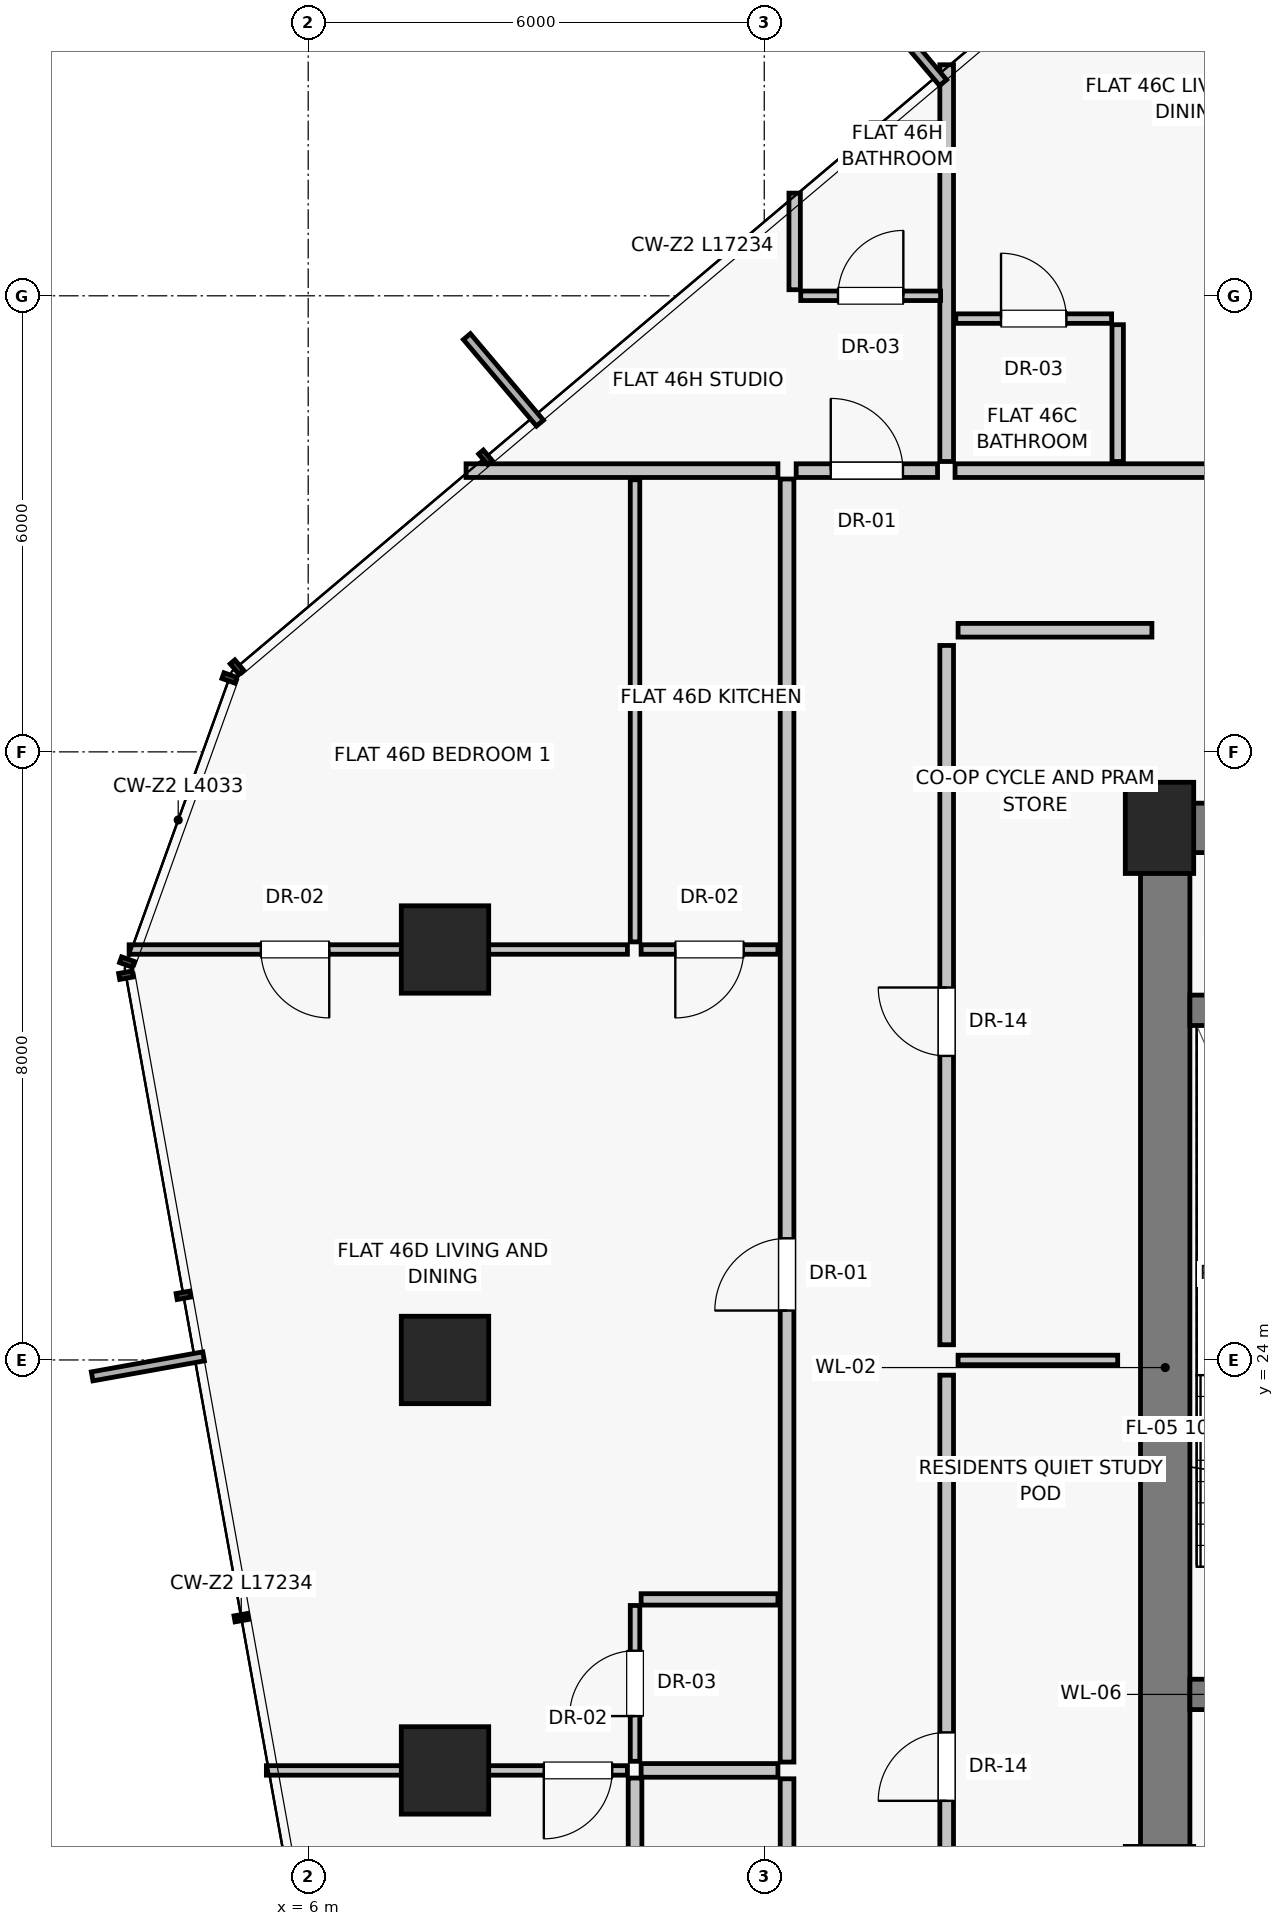
"""IFC4 building model, lengths in metres.
Left out: names, types, materials, properties, quantities, classifications, styles, units other than length and angle.
Written with IfcOpenShell. Run it as: python <this file> out.ifc"""

import sys

from ifc_helpers import new_model, si_unit, direction, frame, frame_2d, origin, origin_2d, place, context, subcontext, project, spatial, rectangle, extrude, source, transform, mapped, element, fill, save


model = new_model("IFC4")
c1 = context("Model", 3, precision=1e-05, world=origin(), true_north=direction((0.0, 1.0)))
c2 = subcontext(c1, "Body", "Model", "MODEL_VIEW")
j1 = project(units=[si_unit("LENGTHUNIT", "METRE"), si_unit("PLANEANGLEUNIT", "RADIAN")], contexts=[c1])
p1 = place(None, origin())
s1 = spatial("IfcSite", under=j1, at=p1, CompositionType="ELEMENT")
p2 = place(p1, origin())
s2 = spatial("IfcBuilding", under=s1, at=p2, CompositionType="ELEMENT")
p3 = place(p2, frame((0.0, 0.0, 163.05)))
s3 = spatial("IfcBuildingStorey", under=s2, at=p3, CompositionType="ELEMENT", Elevation=163.05)
p4 = place(p3, frame((17.2, 31.0, 0.0), z_axis=(0.0, 0.0, 1.0), x_axis=(1.0, 0.0, 0.0)))
e1 = element("IfcColumn", 1, at=p4, inside=s3, PredefinedType="PILASTER", context=c2, shape_type="SweptSolid", body=[
    extrude(rectangle(XDim=0.9, YDim=1.2, at=origin_2d()), origin(), (0.0, 0.0, 1.0), 3.25),
])
for number, where, z_axis, x_axis in (
    (2, (7.8, 29.4, 0.0), (0.0, 0.0, 1.0), (1.0, 0.0, 0.0)),
    (3, (7.8, 24.0, 0.0), (0.0, 0.0, 1.0), (1.0, 0.0, 0.0)),
    (4, (7.8, 18.6, 0.0), (0.0, 0.0, 1.0), (1.0, 0.0, 0.0)),
):
    element("IfcColumn", number, at=place(p3, frame(where, z_axis=z_axis, x_axis=x_axis)), inside=s3, PredefinedType="COLUMN", context=c2, shape_type="SweptSolid", body=[
        extrude(rectangle(XDim=1.15, YDim=1.15, at=origin_2d()), origin(), (0.0, 0.0, 1.0), 3.25),
    ])
p5 = place(p3, frame((17.275, 16.8, 0.0), z_axis=(0.0, 0.0, 1.0), x_axis=(0.0, 1.0, 0.0)))
e5 = element("IfcWall", 5, at=p5, inside=s3, PredefinedType="SHEAR", context=c2, shape_type="SweptSolid", body=[
    extrude(rectangle(XDim=14.2, YDim=0.65, at=frame_2d((7.1, 0.0))), origin(), (0.0, 0.0, 1.0), 3.0),
])
p6 = place(p3, frame((17.2, 31.0, 0.0), z_axis=(0.0, 0.0, 1.0), x_axis=(1.0, 0.0, 0.0)))
e6 = element("IfcWall", 6, at=p6, inside=s3, PredefinedType="SHEAR", context=c2, shape_type="SweptSolid", body=[
    extrude(rectangle(XDim=3.8, YDim=0.65, at=frame_2d((1.9, 0.0))), origin(), (0.0, 0.0, 1.0), 3.0),
])
p7 = place(p6, frame((1.25, 0.0, 0.0)))
e7 = element("IfcOpeningElement", 7, at=p7, cuts=e6, PredefinedType="OPENING", context=c2, shape_type="SweptSolid", body=[
    extrude(rectangle(XDim=0.86, YDim=2.01, at=frame_2d((0.43, 1.005))), frame((0.0, 0.335, 0.0), z_axis=(0.0, -1.0, 0.0), x_axis=(1.0, 0.0, 0.0)), (0.0, 0.0, 1.0), 0.67),
])
p8 = place(p3, frame((17.6, 19.6, 0.0), z_axis=(0.0, 0.0, 1.0), x_axis=(1.0, 0.0, 0.0)))
e8 = element("IfcWall", 8, at=p8, inside=s3, PredefinedType="SHEAR", context=c2, shape_type="SweptSolid", body=[
    extrude(rectangle(XDim=3.4, YDim=0.4, at=frame_2d((1.7, 0.0))), origin(), (0.0, 0.0, 1.0), 3.0),
])
p9 = place(p8, frame((1.05, 0.0, 0.0)))
e9 = element("IfcOpeningElement", 9, at=p9, cuts=e8, PredefinedType="OPENING", context=c2, shape_type="SweptSolid", body=[
    extrude(rectangle(XDim=1.1, YDim=2.03, at=frame_2d((0.55, 1.015))), frame((0.0, 0.21, 0.0), z_axis=(0.0, -1.0, 0.0), x_axis=(1.0, 0.0, 0.0)), (0.0, 0.0, 1.0), 0.42),
])
p10 = place(p3, frame((17.6, 28.6, 0.0), z_axis=(0.0, 0.0, 1.0), x_axis=(1.0, 0.0, 0.0)))
e10 = element("IfcWall", 10, at=p10, inside=s3, PredefinedType="SHEAR", context=c2, shape_type="SweptSolid", body=[
    extrude(rectangle(XDim=3.4, YDim=0.4, at=frame_2d((1.7, 0.0))), origin(), (0.0, 0.0, 1.0), 3.0),
])
p11 = place(p3, frame((14.4, 14.4, 0.0), z_axis=(0.0, 0.0, 1.0), x_axis=(0.0, 1.0, 0.0)))
e11 = element("IfcWall", 11, at=p11, inside=s3, PredefinedType="PARTITIONING", context=c2, shape_type="SweptSolid", body=[
    extrude(rectangle(XDim=9.4, YDim=0.18, at=frame_2d((4.7, 0.0))), origin(), (0.0, 0.0, 1.0), 3.0),
])
p12 = place(p11, frame((3.8, 0.0, 0.0)))
e12 = element("IfcOpeningElement", 12, at=p12, cuts=e11, PredefinedType="OPENING", context=c2, shape_type="SweptSolid", body=[
    extrude(rectangle(XDim=0.9, YDim=2.01, at=frame_2d((0.45, 1.005))), frame((0.0, 0.1, 0.0), z_axis=(0.0, -1.0, 0.0), x_axis=(1.0, 0.0, 0.0)), (0.0, 0.0, 1.0), 0.2),
])
p13 = place(p3, frame((14.4, 24.2, 0.0), z_axis=(0.0, 0.0, 1.0), x_axis=(0.0, 1.0, 0.0)))
e13 = element("IfcWall", 13, at=p13, inside=s3, PredefinedType="PARTITIONING", context=c2, shape_type="SweptSolid", body=[
    extrude(rectangle(XDim=9.2, YDim=0.18, at=frame_2d((4.6, 0.0))), origin(), (0.0, 0.0, 1.0), 3.0),
])
p14 = place(p13, frame((3.8, 0.0, 0.0)))
e14 = element("IfcOpeningElement", 14, at=p14, cuts=e13, PredefinedType="OPENING", context=c2, shape_type="SweptSolid", body=[
    extrude(rectangle(XDim=0.9, YDim=2.01, at=frame_2d((0.45, 1.005))), frame((0.0, 0.1, 0.0), z_axis=(0.0, -1.0, 0.0), x_axis=(1.0, 0.0, 0.0)), (0.0, 0.0, 1.0), 0.2),
])
p15 = place(p3, frame((14.55, 24.0, 0.0), z_axis=(0.0, 0.0, 1.0), x_axis=(1.0, 0.0, 0.0)))
e15 = element("IfcWall", 15, at=p15, inside=s3, PredefinedType="PARTITIONING", context=c2, shape_type="SweptSolid", body=[
    extrude(rectangle(XDim=2.1, YDim=0.125, at=frame_2d((1.05, 0.0))), origin(), (0.0, 0.0, 1.0), 3.0),
])
p16 = place(p3, frame((14.55, 33.6, 0.0), z_axis=(0.0, 0.0, 1.0), x_axis=(1.0, 0.0, 0.0)))
e16 = element("IfcWall", 16, at=p16, inside=s3, PredefinedType="PARTITIONING", context=c2, shape_type="SweptSolid", body=[
    extrude(rectangle(XDim=2.55, YDim=0.18, at=frame_2d((1.275, 0.0))), origin(), (0.0, 0.0, 1.0), 3.0),
])
p17 = place(p3, frame((14.4, 35.82, 0.0), z_axis=(0.0, 0.0, 1.0), x_axis=(0.0, 1.0, 0.0)))
e17 = element("IfcWall", 17, at=p17, inside=s3, PredefinedType="PARTITIONING", context=c2, shape_type="SweptSolid", body=[
    extrude(rectangle(XDim=5.22, YDim=0.18, at=frame_2d((2.61, 0.0))), origin(), (0.0, 0.0, 1.0), 3.0),
])
p18 = place(p3, frame((14.51, 35.7, 0.0), z_axis=(0.0, 0.0, 1.0), x_axis=(1.0, 0.0, 0.0)))
e18 = element("IfcWall", 18, at=p18, inside=s3, PredefinedType="PARTITIONING", context=c2, shape_type="SweptSolid", body=[
    extrude(rectangle(XDim=11.904, YDim=0.18, at=frame_2d((5.952, 0.0))), origin(), (0.0, 0.0, 1.0), 2.58),
])
p19 = place(p18, frame((3.874, 0.0, 0.0)))
e19 = element("IfcOpeningElement", 19, at=p19, cuts=e18, PredefinedType="OPENING", context=c2, shape_type="SweptSolid", body=[
    extrude(rectangle(XDim=0.95, YDim=2.02, at=frame_2d((0.475, 1.01))), frame((0.0, 0.1, 0.0), z_axis=(0.0, -1.0, 0.0), x_axis=(1.0, 0.0, 0.0)), (0.0, 0.0, 1.0), 0.2),
])
p20 = place(p3, frame((16.65, 35.82, 0.0), z_axis=(0.0, 0.0, 1.0), x_axis=(0.0, 1.0, 0.0)))
e20 = element("IfcWall", 20, at=p20, inside=s3, PredefinedType="PARTITIONING", context=c2, shape_type="SweptSolid", body=[
    extrude(rectangle(XDim=1.8, YDim=0.15, at=frame_2d((0.9, 0.0))), origin(), (0.0, 0.0, 1.0), 3.0),
])
p21 = place(p3, frame((14.52, 37.7, 0.0), z_axis=(0.0, 0.0, 1.0), x_axis=(1.0, 0.0, 0.0)))
e21 = element("IfcWall", 21, at=p21, inside=s3, PredefinedType="PARTITIONING", context=c2, shape_type="SweptSolid", body=[
    extrude(rectangle(XDim=2.05, YDim=0.125, at=frame_2d((1.025, 0.0))), origin(), (0.0, 0.0, 1.0), 3.0),
])
p22 = place(p21, frame((0.595, 0.0, 0.0)))
e22 = element("IfcOpeningElement", 22, at=p22, cuts=e21, PredefinedType="OPENING", context=c2, shape_type="SweptSolid", body=[
    extrude(rectangle(XDim=0.86, YDim=2.01, at=frame_2d((0.43, 1.005))), frame((0.0, 0.073, 0.0), z_axis=(0.0, -1.0, 0.0), x_axis=(1.0, 0.0, 0.0)), (0.0, 0.0, 1.0), 0.145),
])
p23 = place(p3, frame((12.18, 35.7, 0.0), z_axis=(0.0, 0.0, 1.0), x_axis=(-1.0, 0.0, 0.0)))
e23 = element("IfcWall", 23, at=p23, inside=s3, PredefinedType="PARTITIONING", context=c2, shape_type="SweptSolid", body=[
    extrude(rectangle(XDim=4.103, YDim=0.18, at=frame_2d((2.052, 0.0))), origin(), (0.0, 0.0, 1.0), 3.0),
])
p24 = place(p3, frame((12.3, 12.21, 0.0), z_axis=(0.0, 0.0, 1.0), x_axis=(0.0, 1.0, 0.0)))
e24 = element("IfcWall", 24, at=p24, inside=s3, PredefinedType="PARTITIONING", context=c2, shape_type="SweptSolid", body=[
    extrude(rectangle(XDim=6.28, YDim=0.18, at=frame_2d((3.14, 0.0))), origin(), (0.0, 0.0, 1.0), 2.58),
])
p25 = place(p24, frame((2.64, 0.0, 0.0)))
e25 = element("IfcOpeningElement", 25, at=p25, cuts=e24, PredefinedType="OPENING", context=c2, shape_type="SweptSolid", body=[
    extrude(rectangle(XDim=1.0, YDim=2.01, at=frame_2d((0.5, 1.005))), frame((0.0, 0.1, 0.0), z_axis=(0.0, -1.0, 0.0), x_axis=(1.0, 0.0, 0.0)), (0.0, 0.0, 1.0), 0.2),
])
p26 = place(p3, frame((12.3, 18.71, 0.0), z_axis=(0.0, 0.0, 1.0), x_axis=(0.0, 1.0, 0.0)))
e26 = element("IfcWall", 26, at=p26, inside=s3, PredefinedType="PARTITIONING", context=c2, shape_type="SweptSolid", body=[
    extrude(rectangle(XDim=16.88, YDim=0.18, at=frame_2d((8.44, 0.0))), origin(), (0.0, 0.0, 1.0), 2.58),
])
p27 = place(p26, frame((5.94, 0.0, 0.0)))
e27 = element("IfcOpeningElement", 27, at=p27, cuts=e26, PredefinedType="OPENING", context=c2, shape_type="SweptSolid", body=[
    extrude(rectangle(XDim=0.95, YDim=2.02, at=frame_2d((0.475, 1.01))), frame((0.0, 0.1, 0.0), z_axis=(0.0, -1.0, 0.0), x_axis=(1.0, 0.0, 0.0)), (0.0, 0.0, 1.0), 0.2),
])
p28 = place(p3, frame((10.3, 12.22, 0.0), z_axis=(0.0, 0.0, 1.0), x_axis=(0.0, 1.0, 0.0)))
e28 = element("IfcWall", 28, at=p28, inside=s3, PredefinedType="PARTITIONING", context=c2, shape_type="SweptSolid", body=[
    extrude(rectangle(XDim=6.28, YDim=0.18, at=frame_2d((3.14, 0.0))), origin(), (0.0, 0.0, 1.0), 3.0),
])
p29 = place(p3, frame((12.18, 18.6, 0.0), z_axis=(0.0, 0.0, 1.0), x_axis=(-1.0, 0.0, 0.0)))
e29 = element("IfcWall", 29, at=p29, inside=s3, PredefinedType="PARTITIONING", context=c2, shape_type="SweptSolid", body=[
    extrude(rectangle(XDim=1.8, YDim=0.18, at=frame_2d((0.9, 0.0))), origin(), (0.0, 0.0, 1.0), 2.378),
])
p30 = place(p3, frame((10.2, 18.6, 0.0), z_axis=(0.0, 0.0, 1.0), x_axis=(-1.0, 0.0, 0.0)))
e30 = element("IfcWall", 30, at=p30, inside=s3, PredefinedType="PARTITIONING", context=c2, shape_type="SweptSolid", body=[
    extrude(rectangle(XDim=4.75, YDim=0.125, at=frame_2d((2.375, 0.0))), origin(), (0.0, 0.0, 1.0), 2.378),
])
p31 = place(p30, frame((0.2, 0.0, 0.0)))
e31 = element("IfcOpeningElement", 31, at=p31, cuts=e30, PredefinedType="OPENING", context=c2, shape_type="SweptSolid", body=[
    extrude(rectangle(XDim=0.9, YDim=2.01, at=frame_2d((0.45, 1.005))), frame((0.0, 0.073, 0.0), z_axis=(0.0, -1.0, 0.0), x_axis=(1.0, 0.0, 0.0)), (0.0, 0.0, 1.0), 0.145),
])
p32 = place(p3, frame((12.18, 20.85, 0.0), z_axis=(0.0, 0.0, 1.0), x_axis=(-1.0, 0.0, 0.0)))
e32 = element("IfcWall", 32, at=p32, inside=s3, PredefinedType="PARTITIONING", context=c2, shape_type="SweptSolid", body=[
    extrude(rectangle(XDim=1.8, YDim=0.15, at=frame_2d((0.9, 0.0))), origin(), (0.0, 0.0, 1.0), 3.0),
])
p33 = place(p3, frame((10.3, 18.72, 0.0), z_axis=(0.0, 0.0, 1.0), x_axis=(0.0, 1.0, 0.0)))
e33 = element("IfcWall", 33, at=p33, inside=s3, PredefinedType="PARTITIONING", context=c2, shape_type="SweptSolid", body=[
    extrude(rectangle(XDim=2.05, YDim=0.125, at=frame_2d((1.025, 0.0))), origin(), (0.0, 0.0, 1.0), 3.0),
])
p34 = place(p33, frame((0.595, 0.0, 0.0)))
e34 = element("IfcOpeningElement", 34, at=p34, cuts=e33, PredefinedType="OPENING", context=c2, shape_type="SweptSolid", body=[
    extrude(rectangle(XDim=0.86, YDim=2.01, at=frame_2d((0.43, 1.005))), frame((0.0, 0.073, 0.0), z_axis=(0.0, -1.0, 0.0), x_axis=(1.0, 0.0, 0.0)), (0.0, 0.0, 1.0), 0.145),
])
p35 = place(p3, frame((12.18, 29.4, 0.0), z_axis=(0.0, 0.0, 1.0), x_axis=(-1.0, 0.0, 0.0)))
e35 = element("IfcWall", 35, at=p35, inside=s3, PredefinedType="PARTITIONING", context=c2, shape_type="SweptSolid", body=[
    extrude(rectangle(XDim=1.8, YDim=0.125, at=frame_2d((0.9, 0.0))), origin(), (0.0, 0.0, 1.0), 2.378),
])
p36 = place(p35, frame((0.45, 0.0, 0.0)))
e36 = element("IfcOpeningElement", 36, at=p36, cuts=e35, PredefinedType="OPENING", context=c2, shape_type="SweptSolid", body=[
    extrude(rectangle(XDim=0.9, YDim=2.01, at=frame_2d((0.45, 1.005))), frame((0.0, 0.073, 0.0), z_axis=(0.0, -1.0, 0.0), x_axis=(1.0, 0.0, 0.0)), (0.0, 0.0, 1.0), 0.145),
])
p37 = place(p3, frame((10.3, 29.5, 0.0), z_axis=(0.0, 0.0, 1.0), x_axis=(0.0, 1.0, 0.0)))
e37 = element("IfcWall", 37, at=p37, inside=s3, PredefinedType="PARTITIONING", context=c2, shape_type="SweptSolid", body=[
    extrude(rectangle(XDim=6.08, YDim=0.125, at=frame_2d((3.04, 0.0))), origin(), (0.0, 0.0, 1.0), 3.0),
])
p38 = place(p3, frame((10.2, 29.4, 0.0), z_axis=(0.0, 0.0, 1.0), x_axis=(-1.0, 0.0, 0.0)))
e38 = element("IfcWall", 38, at=p38, inside=s3, PredefinedType="PARTITIONING", context=c2, shape_type="SweptSolid", body=[
    extrude(rectangle(XDim=6.556, YDim=0.125, at=frame_2d((3.278, 0.0))), origin(), (0.0, 0.0, 1.0), 2.378),
])
p39 = place(p38, frame((3.923, 0.0, 0.0)))
e39 = element("IfcOpeningElement", 39, at=p39, cuts=e38, PredefinedType="OPENING", context=c2, shape_type="SweptSolid", body=[
    extrude(rectangle(XDim=0.9, YDim=2.01, at=frame_2d((0.45, 1.005))), frame((0.0, 0.073, 0.0), z_axis=(0.0, -1.0, 0.0), x_axis=(1.0, 0.0, 0.0)), (0.0, 0.0, 1.0), 0.145),
])
p40 = place(p3, frame((12.42, 35.7, 0.0), z_axis=(0.0, 0.0, 1.0), x_axis=(1.0, 0.0, 0.0)))
e40 = element("IfcWall", 40, at=p40, inside=s3, PredefinedType="PARTITIONING", context=c2, shape_type="SweptSolid", body=[
    extrude(rectangle(XDim=1.86, YDim=0.18, at=frame_2d((0.93, 0.0))), origin(), (0.0, 0.0, 1.0), 3.0),
])
p41 = place(p40, frame((0.455, 0.0, 0.0)))
e41 = element("IfcOpeningElement", 41, at=p41, cuts=e40, PredefinedType="OPENING", context=c2, shape_type="SweptSolid", body=[
    extrude(rectangle(XDim=0.95, YDim=2.02, at=frame_2d((0.475, 1.01))), frame((0.0, 0.1, 0.0), z_axis=(0.0, -1.0, 0.0), x_axis=(1.0, 0.0, 0.0)), (0.0, 0.0, 1.0), 0.2),
])
p42 = place(p3, frame((12.48, 38.0, 0.0), z_axis=(0.0, 0.0, 1.0), x_axis=(1.0, 0.0, 0.0)))
e42 = element("IfcWall", 42, at=p42, inside=s3, PredefinedType="PARTITIONING", context=c2, shape_type="SweptSolid", body=[
    extrude(rectangle(XDim=1.84, YDim=0.125, at=frame_2d((0.92, 0.0))), origin(), (0.0, 0.0, 1.0), 3.0),
])
p43 = place(p42, frame((0.49, 0.0, 0.0)))
e43 = element("IfcOpeningElement", 43, at=p43, cuts=e42, PredefinedType="OPENING", context=c2, shape_type="SweptSolid", body=[
    extrude(rectangle(XDim=0.86, YDim=2.01, at=frame_2d((0.43, 1.005))), frame((0.0, 0.073, 0.0), z_axis=(0.0, -1.0, 0.0), x_axis=(1.0, 0.0, 0.0)), (0.0, 0.0, 1.0), 0.145),
])
p44 = place(p3, frame((13.406, 40.2, 0.0), z_axis=(0.0, 0.0, 1.0), x_axis=(1.0, 0.0, 0.0)))
e44 = element("IfcWall", 44, at=p44, inside=s3, PredefinedType="PARTITIONING", context=c2, shape_type="SweptSolid", body=[
    extrude(rectangle(XDim=0.914, YDim=0.15, at=frame_2d((0.457, 0.0))), origin(), (0.0, 0.0, 1.0), 3.0),
])
p45 = place(p3, frame((12.4, 38.08, 0.0), z_axis=(0.0, 0.0, 1.0), x_axis=(0.0, 1.0, 0.0)))
e45 = element("IfcWall", 45, at=p45, inside=s3, PredefinedType="PARTITIONING", context=c2, shape_type="SweptSolid", body=[
    extrude(rectangle(XDim=1.271, YDim=0.15, at=frame_2d((0.635, 0.0))), origin(), (0.0, 0.0, 1.0), 3.0),
])
m1 = source(origin(), c2, "Body", "SweptSolid", [
    extrude(rectangle(XDim=0.9, YDim=2.01, at=frame_2d((0.45, 1.005))), frame((0.0, 0.025, 0.0), z_axis=(0.0, -1.0, 0.0), x_axis=(1.0, 0.0, 0.0)), (0.0, 0.0, 1.0), 0.05),
])
p46 = place(p12, origin())
e46 = element("IfcDoor", 46, at=p46, inside=s3, OperationType="SINGLE_SWING_LEFT", PredefinedType="DOOR", context=c2, shape_type="MappedRepresentation", body=[
    mapped(m1, transform((0.0, 0.0, 0.0), scale=1.0)),
])
fill(e12, e46)
p47 = place(p14, origin())
e47 = element("IfcDoor", 47, at=p47, inside=s3, OperationType="SINGLE_SWING_RIGHT", PredefinedType="DOOR", context=c2, shape_type="MappedRepresentation", body=[
    mapped(m1, transform((0.0, 0.0, 0.0), scale=1.0)),
])
fill(e14, e47)
m2 = source(origin(), c2, "Body", "SweptSolid", [
    extrude(rectangle(XDim=0.86, YDim=2.01, at=frame_2d((0.43, 1.005))), frame((0.0, 0.025, 0.0), z_axis=(0.0, -1.0, 0.0), x_axis=(1.0, 0.0, 0.0)), (0.0, 0.0, 1.0), 0.05),
])
p48 = place(p22, origin())
e48 = element("IfcDoor", 48, at=p48, inside=s3, OperationType="SINGLE_SWING_LEFT", PredefinedType="DOOR", context=c2, shape_type="MappedRepresentation", body=[
    mapped(m2, transform((0.0, 0.0, 0.0), scale=1.0)),
])
fill(e22, e48)
m3 = source(origin(), c2, "Body", "SweptSolid", [
    extrude(rectangle(XDim=0.95, YDim=2.02, at=frame_2d((0.475, 1.01))), frame((0.0, 0.025, 0.0), z_axis=(0.0, -1.0, 0.0), x_axis=(1.0, 0.0, 0.0)), (0.0, 0.0, 1.0), 0.05),
])
p49 = place(p27, origin())
e49 = element("IfcDoor", 49, at=p49, inside=s3, OperationType="SINGLE_SWING_LEFT", PredefinedType="DOOR", context=c2, shape_type="MappedRepresentation", body=[
    mapped(m3, transform((0.0, 0.0, 0.0), scale=1.0)),
])
fill(e27, e49)
p50 = place(p31, origin())
e50 = element("IfcDoor", 50, at=p50, inside=s3, OperationType="SINGLE_SWING_RIGHT", PredefinedType="DOOR", context=c2, shape_type="MappedRepresentation", body=[
    mapped(m1, transform((0.0, 0.0, 0.0), scale=1.0)),
])
fill(e31, e50)
p51 = place(p34, origin())
e51 = element("IfcDoor", 51, at=p51, inside=s3, OperationType="SINGLE_SWING_LEFT", PredefinedType="DOOR", context=c2, shape_type="MappedRepresentation", body=[
    mapped(m2, transform((0.0, 0.0, 0.0), scale=1.0)),
])
fill(e34, e51)
p52 = place(p36, origin())
e52 = element("IfcDoor", 52, at=p52, inside=s3, OperationType="SINGLE_SWING_RIGHT", PredefinedType="DOOR", context=c2, shape_type="MappedRepresentation", body=[
    mapped(m1, transform((0.0, 0.0, 0.0), scale=1.0)),
])
fill(e36, e52)
p53 = place(p39, origin())
e53 = element("IfcDoor", 53, at=p53, inside=s3, OperationType="SINGLE_SWING_LEFT", PredefinedType="DOOR", context=c2, shape_type="MappedRepresentation", body=[
    mapped(m1, transform((0.0, 0.0, 0.0), scale=1.0)),
])
fill(e39, e53)
p54 = place(p41, origin())
e54 = element("IfcDoor", 54, at=p54, inside=s3, OperationType="SINGLE_SWING_LEFT", PredefinedType="DOOR", context=c2, shape_type="MappedRepresentation", body=[
    mapped(m3, transform((0.0, 0.0, 0.0), scale=1.0)),
])
fill(e41, e54)
p55 = place(p43, origin())
e55 = element("IfcDoor", 55, at=p55, inside=s3, OperationType="SINGLE_SWING_RIGHT", PredefinedType="DOOR", context=c2, shape_type="MappedRepresentation", body=[
    mapped(m2, transform((0.0, 0.0, 0.0), scale=1.0)),
])
fill(e43, e55)
save(model, sys.argv[1])
